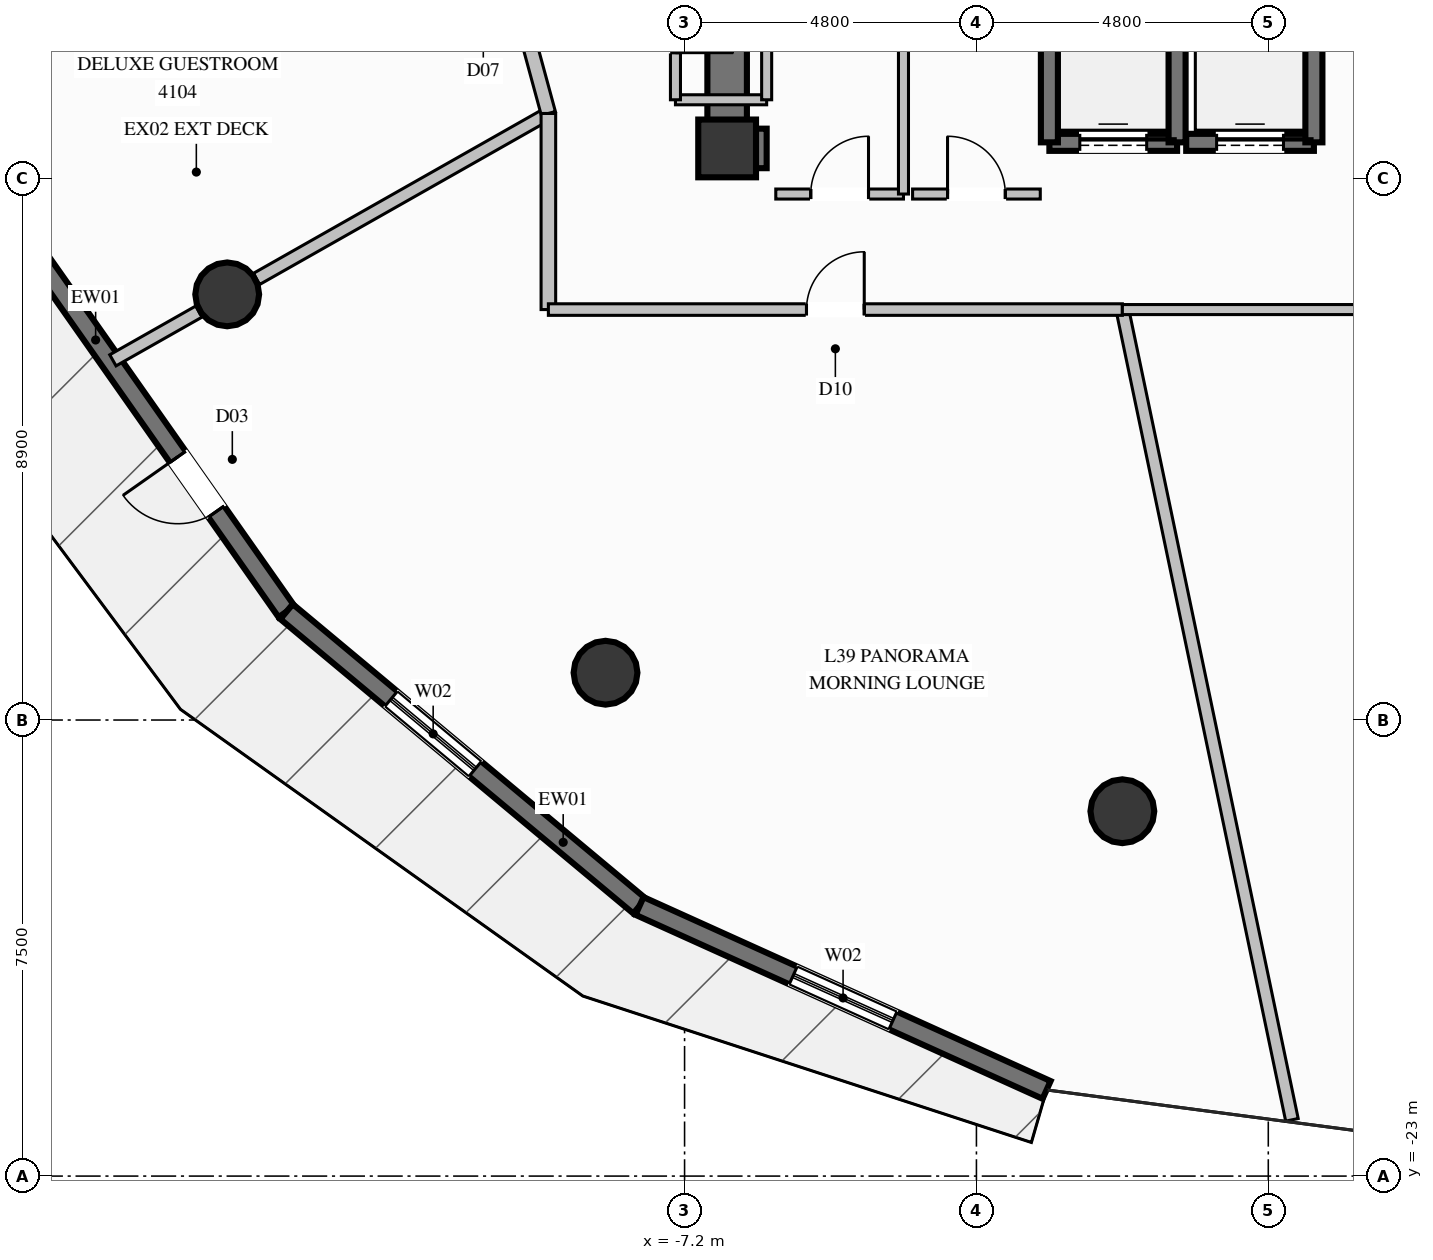
"""IFC4 building model, lengths in metres.
Left out: names, types, materials, properties, quantities, classifications, styles, units other than length and angle.
Written with IfcOpenShell. Run it as: python <this file> out.ifc"""

import sys

from ifc_helpers import new_model, si_unit, direction, frame, frame_2d, origin, origin_2d, place, context, subcontext, project, spatial, rectangle, circle, extrude, element, fill, save


model = new_model("IFC4")
c1 = context("Model", 3, precision=1e-05, world=origin(), true_north=direction((0.0, 1.0)))
c2 = subcontext(c1, "Body", "Model", "MODEL_VIEW")
j1 = project(units=[si_unit("LENGTHUNIT", "METRE"), si_unit("PLANEANGLEUNIT", "RADIAN")], contexts=[c1])
p1 = place(None, origin())
s1 = spatial("IfcSite", under=j1, at=p1, CompositionType="ELEMENT")
p2 = place(p1, origin())
s2 = spatial("IfcBuilding", under=s1, at=p2, CompositionType="ELEMENT")
p3 = place(p2, frame((0.0, 0.0, 153.0)))
s3 = spatial("IfcBuildingStorey", under=s2, at=p3, CompositionType="ELEMENT", Elevation=153.0)
p4 = place(p3, frame((-6.5, -6.1, 0.0), z_axis=(0.0, 0.0, 1.0), x_axis=(1.0, 0.0, 0.0)))
e1 = element("IfcColumn", 1, at=p4, inside=s3, PredefinedType="COLUMN", context=c2, shape_type="SweptSolid", body=[
    extrude(rectangle(XDim=0.95, YDim=0.95, at=origin_2d()), origin(), (0.0, 0.0, 1.0), 3.6),
])
p5 = place(p3, frame((-6.175, -6.1, 0.0), z_axis=(0.0, 0.0, 1.0), x_axis=(1.0, 0.0, 0.0)))
e2 = element("IfcWall", 2, at=p5, inside=s3, PredefinedType="SHEAR", context=c2, shape_type="SweptSolid", body=[
    extrude(rectangle(XDim=0.325, YDim=0.65, at=frame_2d((0.163, 0.0))), origin(), (0.0, 0.0, 1.0), 3.6),
])
p6 = place(p3, frame((-6.5, -6.425, 0.0), z_axis=(0.0, 0.0, 1.0), x_axis=(0.0, 1.0, 0.0)))
e3 = element("IfcWall", 3, at=p6, inside=s3, PredefinedType="SHEAR", context=c2, shape_type="SweptSolid", body=[
    extrude(rectangle(XDim=3.075, YDim=0.65, at=frame_2d((1.538, 0.0))), origin(), (0.0, 0.0, 1.0), 3.6),
])
for number, where, z_axis, x_axis in (
    (4, (-14.722, -8.5, 0.0), (0.0, 0.0, 1.0), (1.0, 0.0, 0.0)),
    (5, (-8.5, -14.722, 0.0), (0.0, 0.0, 1.0), (1.0, 0.0, 0.0)),
    (6, (0.0, -17.0, 0.0), (0.0, 0.0, 1.0), (1.0, 0.0, 0.0)),
):
    element("IfcColumn", number, at=place(p3, frame(where, z_axis=z_axis, x_axis=x_axis)), inside=s3, PredefinedType="COLUMN", context=c2, shape_type="SweptSolid", body=[
        extrude(circle(Radius=0.525, at=origin_2d()), origin(), (0.0, 0.0, 1.0), 3.6),
    ])
p7 = place(p3, frame((-13.746, -13.717, 0.0), z_axis=(0.0, 0.0, 1.0), x_axis=(-0.575065305211, 0.818107508059, 0.0)))
e7 = element("IfcWall", 7, at=p7, inside=s3, PredefinedType="SOLIDWALL", context=c2, shape_type="SweptSolid", body=[
    extrude(rectangle(XDim=7.559, YDim=0.32, at=frame_2d((3.78, 0.0))), origin(), (0.0, 0.0, 1.0), 3.35),
])
p8 = place(p7, frame((2.011, 0.0, 0.0)))
e8 = element("IfcOpeningElement", 8, at=p8, cuts=e7, PredefinedType="OPENING", context=c2, shape_type="SweptSolid", body=[
    extrude(rectangle(XDim=1.1, YDim=2.2, at=frame_2d((0.55, 1.1))), frame((0.0, 0.17, 0.0), z_axis=(0.0, -1.0, 0.0), x_axis=(1.0, 0.0, 0.0)), (0.0, 0.0, 1.0), 0.34),
])
p9 = place(p3, frame((-7.941, -18.558, 0.0), z_axis=(0.0, 0.0, 1.0), x_axis=(-0.767998848651, 0.640451222554, 0.0)))
e9 = element("IfcWall", 9, at=p9, inside=s3, PredefinedType="SOLIDWALL", context=c2, shape_type="SweptSolid", body=[
    extrude(rectangle(XDim=7.559, YDim=0.32, at=frame_2d((3.779, 0.0))), origin(), (0.0, 0.0, 1.0), 3.35),
])
p10 = place(p9, frame((3.519, 0.0, 0.35)))
e10 = element("IfcOpeningElement", 10, at=p10, cuts=e9, PredefinedType="OPENING", context=c2, shape_type="SweptSolid", body=[
    extrude(rectangle(XDim=1.8, YDim=2.6, at=frame_2d((0.9, 1.3))), frame((0.0, 0.17, 0.0), z_axis=(0.0, -1.0, 0.0), x_axis=(1.0, 0.0, 0.0)), (0.0, 0.0, 1.0), 0.34),
])
p11 = place(p3, frame((-1.246, -21.583, 0.0), z_axis=(0.0, 0.0, 1.0), x_axis=(-0.91129739941, 0.411748770282, 0.0)))
e11 = element("IfcWall", 11, at=p11, inside=s3, PredefinedType="SOLIDWALL", context=c2, shape_type="SweptSolid", body=[
    extrude(rectangle(XDim=7.346, YDim=0.32, at=frame_2d((3.673, 0.0))), origin(), (0.0, 0.0, 1.0), 3.35),
])
p12 = place(p11, frame((2.773, 0.0, 0.35)))
e12 = element("IfcOpeningElement", 12, at=p12, cuts=e11, PredefinedType="OPENING", context=c2, shape_type="SweptSolid", body=[
    extrude(rectangle(XDim=1.8, YDim=2.6, at=frame_2d((0.9, 1.3))), frame((0.0, 0.17, 0.0), z_axis=(0.0, -1.0, 0.0), x_axis=(1.0, 0.0, 0.0)), (0.0, 0.0, 1.0), 0.34),
])
p13 = place(p3, frame((-1.2, -6.0, 0.0), z_axis=(0.0, 0.0, 1.0), x_axis=(1.0, 0.0, 0.0)))
e13 = element("IfcWall", 13, at=p13, inside=s3, PredefinedType="SOLIDWALL", context=c2, shape_type="SweptSolid", body=[
    extrude(rectangle(XDim=2.1, YDim=0.28, at=frame_2d((1.05, 0.0))), origin(), (0.0, 0.0, 1.0), 3.35),
])
p14 = place(p13, frame((0.5, 0.0, 0.0)))
e14 = element("IfcOpeningElement", 14, at=p14, cuts=e13, PredefinedType="OPENING", context=c2, shape_type="SweptSolid", body=[
    extrude(rectangle(XDim=1.1, YDim=2.2, at=frame_2d((0.55, 1.1))), frame((0.0, 0.15, 0.0), z_axis=(0.0, -1.0, 0.0), x_axis=(1.0, 0.0, 0.0)), (0.0, 0.0, 1.0), 0.3),
])
for number, where, z_axis, x_axis in (
    (15, (-1.2, -3.5, 0.0), (0.0, 0.0, 1.0), (0.0, -1.0, 0.0)),
    (16, (0.9, -6.0, 0.0), (0.0, 0.0, 1.0), (0.0, 1.0, 0.0)),
):
    element("IfcWall", number, at=place(p3, frame(where, z_axis=z_axis, x_axis=x_axis)), inside=s3, PredefinedType="SOLIDWALL", context=c2, shape_type="SweptSolid", body=[
        extrude(rectangle(XDim=2.5, YDim=0.28, at=frame_2d((1.25, 0.0))), origin(), (0.0, 0.0, 1.0), 3.35),
    ])
p15 = place(p3, frame((1.05, -6.0, 0.0), z_axis=(0.0, 0.0, 1.0), x_axis=(1.0, 0.0, 0.0)))
e17 = element("IfcWall", 17, at=p15, inside=s3, PredefinedType="SOLIDWALL", context=c2, shape_type="SweptSolid", body=[
    extrude(rectangle(XDim=2.1, YDim=0.28, at=frame_2d((1.05, 0.0))), origin(), (0.0, 0.0, 1.0), 3.35),
])
p16 = place(p15, frame((0.5, 0.0, 0.0)))
e18 = element("IfcOpeningElement", 18, at=p16, cuts=e17, PredefinedType="OPENING", context=c2, shape_type="SweptSolid", body=[
    extrude(rectangle(XDim=1.1, YDim=2.2, at=frame_2d((0.55, 1.1))), frame((0.0, 0.15, 0.0), z_axis=(0.0, -1.0, 0.0), x_axis=(1.0, 0.0, 0.0)), (0.0, 0.0, 1.0), 0.3),
])
p17 = place(p3, frame((3.15, -6.0, 0.0), z_axis=(0.0, 0.0, 1.0), x_axis=(0.0, 1.0, 0.0)))
e19 = element("IfcWall", 19, at=p17, inside=s3, PredefinedType="SOLIDWALL", context=c2, shape_type="SweptSolid", body=[
    extrude(rectangle(XDim=2.5, YDim=0.28, at=frame_2d((1.25, 0.0))), origin(), (0.0, 0.0, 1.0), 3.35),
])
p18 = place(p3, frame((-7.35, -5.3, 0.0), z_axis=(0.0, 0.0, 1.0), x_axis=(1.0, 0.0, 0.0)))
e20 = element("IfcWall", 20, at=p18, inside=s3, PredefinedType="PARTITIONING", context=c2, shape_type="SweptSolid", body=[
    extrude(rectangle(XDim=1.5, YDim=0.165, at=frame_2d((0.75, 0.0))), origin(), (0.0, 0.0, 1.0), 2.435),
])
p19 = place(p3, frame((-5.85, -5.3, 0.0), z_axis=(0.0, 0.0, 1.0), x_axis=(0.0, 1.0, 0.0)))
e21 = element("IfcWall", 21, at=p19, inside=s3, PredefinedType="PARTITIONING", context=c2, shape_type="SweptSolid", body=[
    extrude(rectangle(XDim=2.5, YDim=0.165, at=frame_2d((1.25, 0.0))), origin(), (0.0, 0.0, 1.0), 2.435),
])
p20 = place(p3, frame((-7.35, -2.8, 0.0), z_axis=(0.0, 0.0, 1.0), x_axis=(0.0, -1.0, 0.0)))
e22 = element("IfcWall", 22, at=p20, inside=s3, PredefinedType="PARTITIONING", context=c2, shape_type="SweptSolid", body=[
    extrude(rectangle(XDim=2.5, YDim=0.165, at=frame_2d((1.25, 0.0))), origin(), (0.0, 0.0, 1.0), 3.35),
])
p21 = place(p20, frame((0.775, 0.0, 0.0)))
e23 = element("IfcOpeningElement", 23, at=p21, cuts=e22, PredefinedType="OPENING", context=c2, shape_type="SweptSolid", body=[
    extrude(rectangle(XDim=0.95, YDim=2.1, at=frame_2d((0.475, 1.05))), frame((0.0, 0.093, 0.0), z_axis=(0.0, -1.0, 0.0), x_axis=(1.0, 0.0, 0.0)), (0.0, 0.0, 1.0), 0.185),
])
p22 = place(p3, frame((-5.7, -6.85, 0.0), z_axis=(0.0, 0.0, 1.0), x_axis=(1.0, 0.0, 0.0)))
e24 = element("IfcWall", 24, at=p22, inside=s3, PredefinedType="PARTITIONING", context=c2, shape_type="SweptSolid", body=[
    extrude(rectangle(XDim=2.1, YDim=0.165, at=frame_2d((1.05, 0.0))), origin(), (0.0, 0.0, 1.0), 2.435),
])
p23 = place(p22, frame((0.575, 0.0, 0.0)))
e25 = element("IfcOpeningElement", 25, at=p23, cuts=e24, PredefinedType="OPENING", context=c2, shape_type="SweptSolid", body=[
    extrude(rectangle(XDim=0.95, YDim=2.1, at=frame_2d((0.475, 1.05))), frame((0.0, 0.093, 0.0), z_axis=(0.0, -1.0, 0.0), x_axis=(1.0, 0.0, 0.0)), (0.0, 0.0, 1.0), 0.185),
])
p24 = place(p3, frame((-3.6, -6.85, 0.0), z_axis=(0.0, 0.0, 1.0), x_axis=(0.0, 1.0, 0.0)))
e26 = element("IfcWall", 26, at=p24, inside=s3, PredefinedType="PARTITIONING", context=c2, shape_type="SweptSolid", body=[
    extrude(rectangle(XDim=3.35, YDim=0.165, at=frame_2d((1.675, 0.0))), origin(), (0.0, 0.0, 1.0), 3.35),
])
p25 = place(p3, frame((-3.45, -6.85, 0.0), z_axis=(0.0, 0.0, 1.0), x_axis=(1.0, 0.0, 0.0)))
e27 = element("IfcWall", 27, at=p25, inside=s3, PredefinedType="PARTITIONING", context=c2, shape_type="SweptSolid", body=[
    extrude(rectangle(XDim=2.1, YDim=0.165, at=frame_2d((1.05, 0.0))), origin(), (0.0, 0.0, 1.0), 2.435),
])
p26 = place(p25, frame((0.575, 0.0, 0.0)))
e28 = element("IfcOpeningElement", 28, at=p26, cuts=e27, PredefinedType="OPENING", context=c2, shape_type="SweptSolid", body=[
    extrude(rectangle(XDim=0.95, YDim=2.1, at=frame_2d((0.475, 1.05))), frame((0.0, 0.093, 0.0), z_axis=(0.0, -1.0, 0.0), x_axis=(1.0, 0.0, 0.0)), (0.0, 0.0, 1.0), 0.185),
])
p27 = place(p3, frame((-9.44, -5.525, 0.0), z_axis=(0.0, 0.0, 1.0), x_axis=(-0.86993170577, -0.493172208561, 0.0)))
e29 = element("IfcWall", 29, at=p27, inside=s3, PredefinedType="PARTITIONING", context=c2, shape_type="SweptSolid", body=[
    extrude(rectangle(XDim=5.518, YDim=0.21, at=frame_2d((2.759, 0.0))), origin(), (0.0, 0.0, 1.0), 2.791),
])
p28 = place(p3, frame((-15.188, -8.783, 0.0), z_axis=(0.0, 0.0, 1.0), x_axis=(-0.869837463866, -0.493338409669, 0.0)))
e30 = element("IfcWall", 30, at=p28, inside=s3, PredefinedType="PARTITIONING", context=c2, shape_type="SweptSolid", body=[
    extrude(rectangle(XDim=1.626, YDim=0.21, at=frame_2d((0.813, 0.0))), origin(), (0.0, 0.0, 1.0), 3.35),
])
p29 = place(p3, frame((-10.287, -2.407, 0.0), z_axis=(0.0, 0.0, 1.0), x_axis=(0.262202977539, -0.965012745289, 0.0)))
e31 = element("IfcWall", 31, at=p29, inside=s3, PredefinedType="PARTITIONING", context=c2, shape_type="SweptSolid", body=[
    extrude(rectangle(XDim=3.231, YDim=0.24, at=frame_2d((1.615, 0.0))), origin(), (0.0, 0.0, 1.0), 3.35),
])
p30 = place(p29, frame((1.115, 0.0, 0.0)))
e32 = element("IfcOpeningElement", 32, at=p30, cuts=e31, PredefinedType="OPENING", context=c2, shape_type="SweptSolid", body=[
    extrude(rectangle(XDim=1.0, YDim=2.2, at=frame_2d((0.5, 1.1))), frame((0.0, 0.13, 0.0), z_axis=(0.0, -1.0, 0.0), x_axis=(1.0, 0.0, 0.0)), (0.0, 0.0, 1.0), 0.26),
])
p31 = place(p3, frame((0.0, -8.75, 0.0), z_axis=(0.0, 0.0, 1.0), x_axis=(0.204871544732, -0.978788869041, 0.0)))
e33 = element("IfcWall", 33, at=p31, inside=s3, PredefinedType="PARTITIONING", context=c2, shape_type="SweptSolid", body=[
    extrude(rectangle(XDim=13.614, YDim=0.21, at=frame_2d((6.807, 0.0))), origin(), (0.0, 0.0, 1.0), 3.35),
])
p32 = place(p3, frame((-9.44, -5.525, 0.0), z_axis=(0.0, 0.0, 1.0), x_axis=(0.0, -1.0, 0.0)))
e34 = element("IfcWall", 34, at=p32, inside=s3, PredefinedType="PARTITIONING", context=c2, shape_type="SweptSolid", body=[
    extrude(rectangle(XDim=3.225, YDim=0.24, at=frame_2d((1.613, 0.0))), origin(), (0.0, 0.0, 1.0), 3.35),
])
p33 = place(p3, frame((-9.44, -8.75, 0.0), z_axis=(0.0, 0.0, 1.0), x_axis=(1.0, 0.0, 0.0)))
e35 = element("IfcWall", 35, at=p33, inside=s3, PredefinedType="PARTITIONING", context=c2, shape_type="SweptSolid", body=[
    extrude(rectangle(XDim=9.44, YDim=0.19, at=frame_2d((4.72, 0.0))), origin(), (0.0, 0.0, 1.0), 3.35),
])
p34 = place(p33, frame((4.245, 0.0, 0.0)))
e36 = element("IfcOpeningElement", 36, at=p34, cuts=e35, PredefinedType="OPENING", context=c2, shape_type="SweptSolid", body=[
    extrude(rectangle(XDim=0.95, YDim=2.1, at=frame_2d((0.475, 1.05))), frame((0.0, 0.105, 0.0), z_axis=(0.0, -1.0, 0.0), x_axis=(1.0, 0.0, 0.0)), (0.0, 0.0, 1.0), 0.21),
])
p35 = place(p3, frame((0.0, -8.75, 0.0), z_axis=(0.0, 0.0, 1.0), x_axis=(1.0, 0.0, 0.0)))
e37 = element("IfcWall", 37, at=p35, inside=s3, PredefinedType="PARTITIONING", context=c2, shape_type="SweptSolid", body=[
    extrude(rectangle(XDim=9.44, YDim=0.165, at=frame_2d((4.72, 0.0))), origin(), (0.0, 0.0, 1.0), 3.35),
])
p36 = place(p35, frame((4.245, 0.0, 0.0)))
e38 = element("IfcOpeningElement", 38, at=p36, cuts=e37, PredefinedType="OPENING", context=c2, shape_type="SweptSolid", body=[
    extrude(rectangle(XDim=0.95, YDim=2.1, at=frame_2d((0.475, 1.05))), frame((0.0, 0.093, 0.0), z_axis=(0.0, -1.0, 0.0), x_axis=(1.0, 0.0, 0.0)), (0.0, 0.0, 1.0), 0.185),
])
p37 = place(p8, origin())
e39 = element("IfcDoor", 39, at=p37, inside=s3, OperationType="SINGLE_SWING_RIGHT", PredefinedType="DOOR", context=c2, shape_type="SweptSolid", body=[
    extrude(rectangle(XDim=1.1, YDim=2.2, at=frame_2d((0.55, 1.1))), frame((0.0, 0.025, 0.0), z_axis=(0.0, -1.0, 0.0), x_axis=(1.0, 0.0, 0.0)), (0.0, 0.0, 1.0), 0.05),
])
fill(e8, e39)
p38 = place(p10, origin())
e40 = element("IfcWindow", 40, at=p38, inside=s3, PartitioningType="SINGLE_PANEL", PredefinedType="WINDOW", context=c2, shape_type="SweptSolid", body=[
    extrude(rectangle(XDim=1.8, YDim=2.6, at=frame_2d((0.9, 1.3))), frame((0.0, 0.03, 0.0), z_axis=(0.0, -1.0, 0.0), x_axis=(1.0, 0.0, 0.0)), (0.0, 0.0, 1.0), 0.06),
])
fill(e10, e40)
p39 = place(p12, origin())
e41 = element("IfcWindow", 41, at=p39, inside=s3, PartitioningType="SINGLE_PANEL", PredefinedType="WINDOW", context=c2, shape_type="SweptSolid", body=[
    extrude(rectangle(XDim=1.8, YDim=2.6, at=frame_2d((0.9, 1.3))), frame((0.0, 0.03, 0.0), z_axis=(0.0, -1.0, 0.0), x_axis=(1.0, 0.0, 0.0)), (0.0, 0.0, 1.0), 0.06),
])
fill(e12, e41)
p40 = place(p14, origin())
e42 = element("IfcDoor", 42, at=p40, inside=s3, OperationType="SLIDING_TO_LEFT", PredefinedType="DOOR", context=c2, shape_type="SweptSolid", body=[
    extrude(rectangle(XDim=1.1, YDim=2.2, at=frame_2d((0.55, 1.1))), frame((0.0, 0.025, 0.0), z_axis=(0.0, -1.0, 0.0), x_axis=(1.0, 0.0, 0.0)), (0.0, 0.0, 1.0), 0.05),
])
fill(e14, e42)
p41 = place(p16, origin())
e43 = element("IfcDoor", 43, at=p41, inside=s3, OperationType="SLIDING_TO_LEFT", PredefinedType="DOOR", context=c2, shape_type="SweptSolid", body=[
    extrude(rectangle(XDim=1.1, YDim=2.2, at=frame_2d((0.55, 1.1))), frame((0.0, 0.025, 0.0), z_axis=(0.0, -1.0, 0.0), x_axis=(1.0, 0.0, 0.0)), (0.0, 0.0, 1.0), 0.05),
])
fill(e18, e43)
p42 = place(p21, origin())
e44 = element("IfcDoor", 44, at=p42, inside=s3, OperationType="SINGLE_SWING_RIGHT", PredefinedType="DOOR", context=c2, shape_type="SweptSolid", body=[
    extrude(rectangle(XDim=0.95, YDim=2.1, at=frame_2d((0.475, 1.05))), frame((0.0, 0.025, 0.0), z_axis=(0.0, -1.0, 0.0), x_axis=(1.0, 0.0, 0.0)), (0.0, 0.0, 1.0), 0.05),
])
fill(e23, e44)
p43 = place(p23, origin())
e45 = element("IfcDoor", 45, at=p43, inside=s3, OperationType="SINGLE_SWING_RIGHT", PredefinedType="DOOR", context=c2, shape_type="SweptSolid", body=[
    extrude(rectangle(XDim=0.95, YDim=2.1, at=frame_2d((0.475, 1.05))), frame((0.0, 0.025, 0.0), z_axis=(0.0, -1.0, 0.0), x_axis=(1.0, 0.0, 0.0)), (0.0, 0.0, 1.0), 0.05),
])
fill(e25, e45)
p44 = place(p26, origin())
e46 = element("IfcDoor", 46, at=p44, inside=s3, OperationType="SINGLE_SWING_LEFT", PredefinedType="DOOR", context=c2, shape_type="SweptSolid", body=[
    extrude(rectangle(XDim=0.95, YDim=2.1, at=frame_2d((0.475, 1.05))), frame((0.0, 0.025, 0.0), z_axis=(0.0, -1.0, 0.0), x_axis=(1.0, 0.0, 0.0)), (0.0, 0.0, 1.0), 0.05),
])
fill(e28, e46)
p45 = place(p34, origin())
e47 = element("IfcDoor", 47, at=p45, inside=s3, OperationType="SINGLE_SWING_RIGHT", PredefinedType="DOOR", context=c2, shape_type="SweptSolid", body=[
    extrude(rectangle(XDim=0.95, YDim=2.1, at=frame_2d((0.475, 1.05))), frame((0.0, 0.025, 0.0), z_axis=(0.0, -1.0, 0.0), x_axis=(1.0, 0.0, 0.0)), (0.0, 0.0, 1.0), 0.05),
])
fill(e36, e47)
save(model, sys.argv[1])
